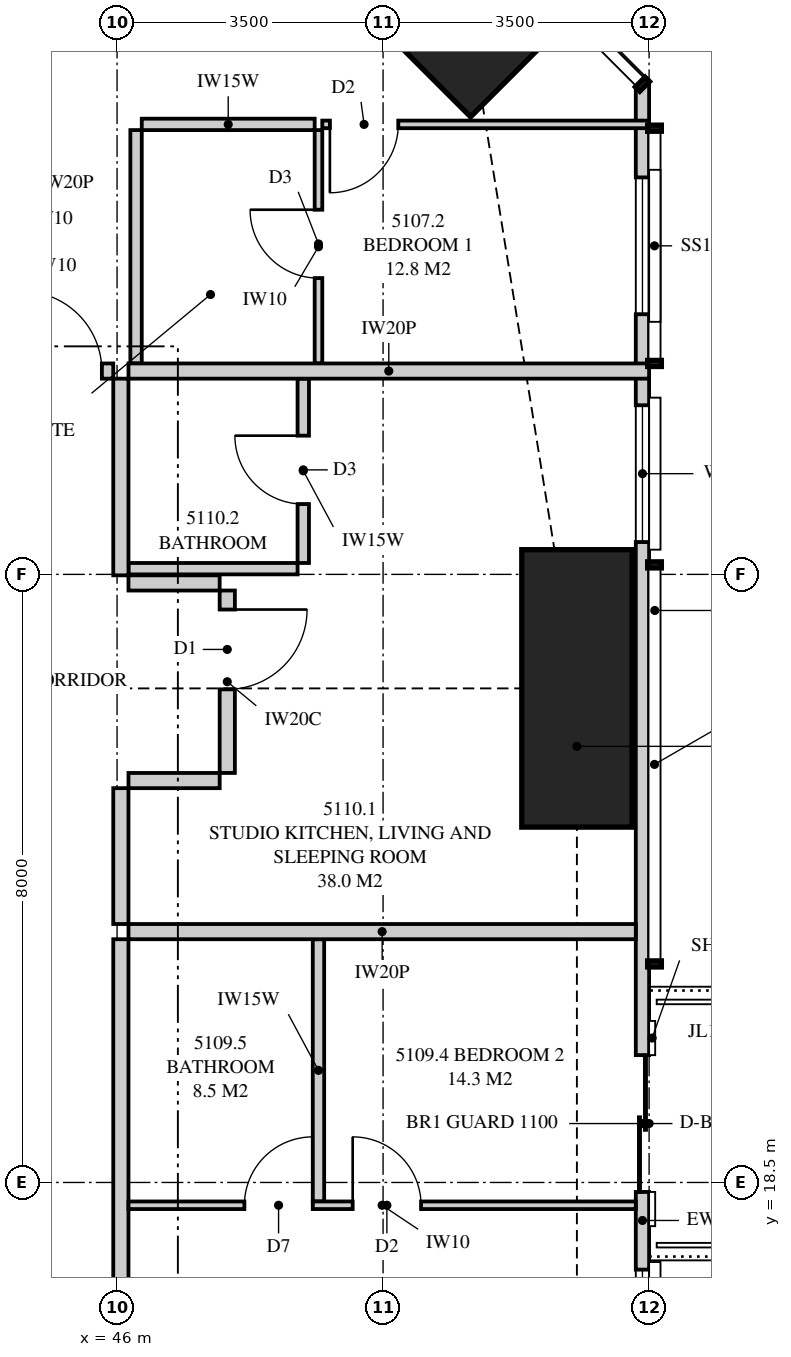
"""IFC4 building model, lengths in metres.
Left out: names, types, materials, properties, quantities, classifications, styles, units other than length and angle.
Written with IfcOpenShell. Run it as: python <this file> out.ifc"""

import sys

from ifc_helpers import new_model, si_unit, direction, frame, frame_2d, origin, origin_2d, place, context, subcontext, project, spatial, polyline, rectangle, outline, extrude, element, fill, save


model = new_model("IFC4")
c1 = context("Model", 3, precision=1e-05, world=origin(), true_north=direction((0.0, 1.0)))
c2 = subcontext(c1, "Body", "Model", "MODEL_VIEW")
j1 = project(units=[si_unit("LENGTHUNIT", "METRE"), si_unit("PLANEANGLEUNIT", "RADIAN")], contexts=[c1])
p1 = place(None, origin())
s1 = spatial("IfcSite", under=j1, at=p1, CompositionType="ELEMENT")
p2 = place(p1, origin())
s2 = spatial("IfcBuilding", under=s1, at=p2, CompositionType="ELEMENT")
p3 = place(p2, frame((0.0, 0.0, 187.85)))
s3 = spatial("IfcBuildingStorey", under=s2, at=p3, CompositionType="ELEMENT", Elevation=187.85)
p4 = place(p3, frame((52.05, 25.0, 0.0), z_axis=(0.0, 0.0, 1.0), x_axis=(1.0, 0.0, 0.0)))
e1 = element("IfcColumn", 1, at=p4, inside=s3, PredefinedType="COLUMN", context=c2, shape_type="SweptSolid", body=[
    extrude(rectangle(XDim=1.45, YDim=3.65, at=origin_2d()), origin(), (0.0, 0.0, 1.0), 3.35),
])
p5 = place(p3, frame((50.652, 33.652, 0.0), z_axis=(0.0, 0.0, 1.0), x_axis=(0.707106781187, 0.707106781187, 0.0)))
e2 = element("IfcColumn", 2, at=p5, inside=s3, PredefinedType="COLUMN", context=c2, shape_type="SweptSolid", body=[
    extrude(rectangle(XDim=1.6, YDim=1.6, at=origin_2d()), origin(), (0.0, 0.0, 1.0), 3.35),
])
p6 = place(p3, frame((52.913, 3.051, 0.0), z_axis=(0.0, 0.0, 1.0), x_axis=(0.0, 1.0, 0.0)))
e3 = element("IfcWall", 3, at=p6, inside=s3, PredefinedType="SOLIDWALL", context=c2, shape_type="SweptSolid", body=[
    extrude(outline(polyline([(0.0, 0.0), (29.897, 0.0), (29.897, 3.11), (22.167, 3.11), (22.167, 2.15), (22.074, 2.15), (22.074, 3.11), (21.949, 3.11), (21.949, 2.15), (9.949, 2.15), (9.949, 3.11), (9.847, 3.11), (9.847, 2.15), (9.706, 2.15), (9.706, 3.11), (0.0, 3.11), (0.0, 0.0)])), frame((0.0, 0.087, 0.0), z_axis=(0.0, -1.0, 0.0), x_axis=(1.0, 0.0, 0.0)), (0.0, 0.0, 1.0), 0.175),
])
p7 = place(p6, frame((1.137, 0.0, 0.4)))
e4 = element("IfcOpeningElement", 4, at=p7, cuts=e3, PredefinedType="OPENING", context=c2, shape_type="SweptSolid", body=[
    extrude(rectangle(XDim=2.4, YDim=1.7, at=frame_2d((1.2, 0.85))), frame((0.0, 0.097, 0.0), z_axis=(0.0, -1.0, 0.0), x_axis=(1.0, 0.0, 0.0)), (0.0, 0.0, 1.0), 0.195),
])
p8 = place(p6, frame((5.674, 0.0, 0.4)))
e5 = element("IfcOpeningElement", 5, at=p8, cuts=e3, PredefinedType="OPENING", context=c2, shape_type="SweptSolid", body=[
    extrude(rectangle(XDim=1.8, YDim=1.7, at=frame_2d((0.9, 0.85))), frame((0.0, 0.097, 0.0), z_axis=(0.0, -1.0, 0.0), x_axis=(1.0, 0.0, 0.0)), (0.0, 0.0, 1.0), 0.195),
])
p9 = place(p6, frame((11.902, 0.0, 0.4)))
e6 = element("IfcOpeningElement", 6, at=p9, cuts=e3, PredefinedType="OPENING", context=c2, shape_type="SweptSolid", body=[
    extrude(rectangle(XDim=2.4, YDim=1.7, at=frame_2d((1.2, 0.85))), frame((0.0, 0.097, 0.0), z_axis=(0.0, -1.0, 0.0), x_axis=(1.0, 0.0, 0.0)), (0.0, 0.0, 1.0), 0.195),
])
p10 = place(p6, frame((15.324, 0.0, 0.0)))
e7 = element("IfcOpeningElement", 7, at=p10, cuts=e3, PredefinedType="OPENING", context=c2, shape_type="SweptSolid", body=[
    extrude(rectangle(XDim=1.8, YDim=2.1, at=frame_2d((0.9, 1.05))), frame((0.0, 0.097, 0.0), z_axis=(0.0, -1.0, 0.0), x_axis=(1.0, 0.0, 0.0)), (0.0, 0.0, 1.0), 0.195),
])
p11 = place(p6, frame((23.874, 0.0, 0.4)))
e8 = element("IfcOpeningElement", 8, at=p11, cuts=e3, PredefinedType="OPENING", context=c2, shape_type="SweptSolid", body=[
    extrude(rectangle(XDim=1.8, YDim=1.7, at=frame_2d((0.9, 0.85))), frame((0.0, 0.097, 0.0), z_axis=(0.0, -1.0, 0.0), x_axis=(1.0, 0.0, 0.0)), (0.0, 0.0, 1.0), 0.195),
])
p12 = place(p6, frame((26.871, 0.0, 0.4)))
e9 = element("IfcOpeningElement", 9, at=p12, cuts=e3, PredefinedType="OPENING", context=c2, shape_type="SweptSolid", body=[
    extrude(rectangle(XDim=1.8, YDim=1.7, at=frame_2d((0.9, 0.85))), frame((0.0, 0.097, 0.0), z_axis=(0.0, -1.0, 0.0), x_axis=(1.0, 0.0, 0.0)), (0.0, 0.0, 1.0), 0.195),
])
p13 = place(p3, frame((42.05, 29.175, 0.0), z_axis=(0.0, 0.0, 1.0), x_axis=(1.0, 0.0, 0.0)))
e10 = element("IfcWall", 10, at=p13, inside=s3, PredefinedType="PARTITIONING", context=c2, shape_type="SweptSolid", body=[
    extrude(outline(polyline([(0.0, 0.0), (3.9, 0.0), (3.9, 3.11), (1.037, 3.11), (1.037, 2.541), (0.363, 2.541), (0.363, 3.11), (0.0, 3.11), (0.0, 0.0)])), frame((0.0, 0.1, 0.0), z_axis=(0.0, -1.0, 0.0), x_axis=(1.0, 0.0, 0.0)), (0.0, 0.0, 1.0), 0.2),
])
p14 = place(p13, frame((2.7, 0.0, 0.0)))
e11 = element("IfcOpeningElement", 11, at=p14, cuts=e10, PredefinedType="OPENING", context=c2, shape_type="SweptSolid", body=[
    extrude(rectangle(XDim=1.05, YDim=2.2, at=frame_2d((0.525, 1.1))), frame((0.0, 0.11, 0.0), z_axis=(0.0, -1.0, 0.0), x_axis=(1.0, 0.0, 0.0)), (0.0, 0.0, 1.0), 0.22),
])
p15 = place(p3, frame((48.65, 32.345, 0.0), z_axis=(0.0, 0.0, 1.0), x_axis=(0.0, -1.0, 0.0)))
e12 = element("IfcWall", 12, at=p15, inside=s3, PredefinedType="PARTITIONING", context=c2, shape_type="SweptSolid", body=[
    extrude(rectangle(XDim=3.07, YDim=0.1, at=frame_2d((1.535, 0.0))), origin(), (0.0, 0.0, 1.0), 3.11),
])
p16 = place(p15, frame((1.048, 0.0, 0.0)))
e13 = element("IfcOpeningElement", 13, at=p16, cuts=e12, PredefinedType="OPENING", context=c2, shape_type="SweptSolid", body=[
    extrude(rectangle(XDim=0.9, YDim=2.1, at=frame_2d((0.45, 1.05))), frame((0.0, 0.06, 0.0), z_axis=(0.0, -1.0, 0.0), x_axis=(1.0, 0.0, 0.0)), (0.0, 0.0, 1.0), 0.12),
])
p17 = place(p3, frame((48.7, 32.42, 0.0), z_axis=(0.0, 0.0, 1.0), x_axis=(1.0, 0.0, 0.0)))
e14 = element("IfcWall", 14, at=p17, inside=s3, PredefinedType="PARTITIONING", context=c2, shape_type="SweptSolid", body=[
    extrude(outline(polyline([(0.0, 0.0), (4.3, 0.0), (4.3, 3.11), (3.022, 3.11), (3.022, 2.15), (1.279, 2.15), (1.279, 3.11), (0.0, 3.11), (0.0, 0.0)])), frame((0.0, 0.05, 0.0), z_axis=(0.0, -1.0, 0.0), x_axis=(1.0, 0.0, 0.0)), (0.0, 0.0, 1.0), 0.1),
])
p18 = place(p17, frame((0.1, 0.0, 0.0)))
e15 = element("IfcOpeningElement", 15, at=p18, cuts=e14, PredefinedType="OPENING", context=c2, shape_type="SweptSolid", body=[
    extrude(rectangle(XDim=0.9, YDim=2.1, at=frame_2d((0.45, 1.05))), frame((0.0, 0.06, 0.0), z_axis=(0.0, -1.0, 0.0), x_axis=(1.0, 0.0, 0.0)), (0.0, 0.0, 1.0), 0.12),
])
p19 = place(p3, frame((46.325, 32.42, 0.0), z_axis=(0.0, 0.0, 1.0), x_axis=(1.0, 0.0, 0.0)))
e16 = element("IfcWall", 16, at=p19, inside=s3, PredefinedType="PLUMBINGWALL", context=c2, shape_type="SweptSolid", body=[
    extrude(rectangle(XDim=2.275, YDim=0.15, at=frame_2d((1.138, 0.0))), origin(), (0.0, 0.0, 1.0), 3.11),
])
p20 = place(p3, frame((46.25, 32.345, 0.0), z_axis=(0.0, 0.0, 1.0), x_axis=(0.0, -1.0, 0.0)))
e17 = element("IfcWall", 17, at=p20, inside=s3, PredefinedType="PLUMBINGWALL", context=c2, shape_type="SweptSolid", body=[
    extrude(rectangle(XDim=3.07, YDim=0.15, at=frame_2d((1.535, 0.0))), origin(), (0.0, 0.0, 1.0), 3.11),
])
p21 = place(p3, frame((46.15, 29.175, 0.0), z_axis=(0.0, 0.0, 1.0), x_axis=(1.0, 0.0, 0.0)))
e18 = element("IfcWall", 18, at=p21, inside=s3, PredefinedType="PARTITIONING", context=c2, shape_type="SweptSolid", body=[
    extrude(outline(polyline([(0.0, 0.0), (6.85, 0.0), (6.85, 3.11), (6.147, 3.11), (6.147, 2.15), (4.303, 2.15), (4.303, 3.11), (0.0, 3.11), (0.0, 0.0)])), frame((0.0, 0.1, 0.0), z_axis=(0.0, -1.0, 0.0), x_axis=(1.0, 0.0, 0.0)), (0.0, 0.0, 1.0), 0.2),
])
p22 = place(p3, frame((52.825, 21.8, 0.0), z_axis=(0.0, 0.0, 1.0), x_axis=(-1.0, 0.0, 0.0)))
e19 = element("IfcWall", 19, at=p22, inside=s3, PredefinedType="PARTITIONING", context=c2, shape_type="SweptSolid", body=[
    extrude(outline(polyline([(0.0, 0.0), (6.675, 0.0), (6.675, 3.11), (1.685, 3.11), (1.685, 2.15), (0.0, 2.15), (0.0, 3.11), (0.0, 0.0)])), frame((0.0, 0.1, 0.0), z_axis=(0.0, -1.0, 0.0), x_axis=(1.0, 0.0, 0.0)), (0.0, 0.0, 1.0), 0.2),
])
p23 = place(p3, frame((46.05, 7.925, 0.0), z_axis=(0.0, 0.0, 1.0), x_axis=(0.0, 1.0, 0.0)))
e20 = element("IfcWall", 20, at=p23, inside=s3, PredefinedType="PARTITIONING", context=c2, shape_type="SweptSolid", body=[
    extrude(outline(polyline([(0.0, 0.0), (13.775, 0.0), (13.775, 3.11), (5.412, 3.11), (5.412, 2.541), (4.738, 2.541), (4.738, 3.11), (0.0, 3.11), (0.0, 0.0)])), frame((0.0, 0.1, 0.0), z_axis=(0.0, -1.0, 0.0), x_axis=(1.0, 0.0, 0.0)), (0.0, 0.0, 1.0), 0.2),
])
p24 = place(p23, frame((6.387, 0.0, 0.0)))
e21 = element("IfcOpeningElement", 21, at=p24, cuts=e20, PredefinedType="OPENING", context=c2, shape_type="SweptSolid", body=[
    extrude(rectangle(XDim=1.05, YDim=2.2, at=frame_2d((0.525, 1.1))), frame((0.0, 0.11, 0.0), z_axis=(0.0, -1.0, 0.0), x_axis=(1.0, 0.0, 0.0)), (0.0, 0.0, 1.0), 0.22),
])
p25 = place(p3, frame((52.825, 18.2, 0.0), z_axis=(0.0, 0.0, 1.0), x_axis=(-1.0, 0.0, 0.0)))
e22 = element("IfcWall", 22, at=p25, inside=s3, PredefinedType="PARTITIONING", context=c2, shape_type="SweptSolid", body=[
    extrude(outline(polyline([(0.0, 0.0), (6.675, 0.0), (6.675, 3.11), (1.635, 3.11), (1.635, 2.15), (0.0, 2.15), (0.0, 3.11), (0.0, 0.0)])), frame((0.0, 0.05, 0.0), z_axis=(0.0, -1.0, 0.0), x_axis=(1.0, 0.0, 0.0)), (0.0, 0.0, 1.0), 0.1),
])
p26 = place(p25, frame((2.825, 0.0, 0.0)))
e23 = element("IfcOpeningElement", 23, at=p26, cuts=e22, PredefinedType="OPENING", context=c2, shape_type="SweptSolid", body=[
    extrude(rectangle(XDim=0.9, YDim=2.1, at=frame_2d((0.45, 1.05))), frame((0.0, 0.06, 0.0), z_axis=(0.0, -1.0, 0.0), x_axis=(1.0, 0.0, 0.0)), (0.0, 0.0, 1.0), 0.12),
])
p27 = place(p25, frame((4.25, 0.0, 0.0)))
e24 = element("IfcOpeningElement", 24, at=p27, cuts=e22, PredefinedType="OPENING", context=c2, shape_type="SweptSolid", body=[
    extrude(rectangle(XDim=0.9, YDim=2.1, at=frame_2d((0.45, 1.05))), frame((0.0, 0.06, 0.0), z_axis=(0.0, -1.0, 0.0), x_axis=(1.0, 0.0, 0.0)), (0.0, 0.0, 1.0), 0.12),
])
p28 = place(p3, frame((48.65, 18.25, 0.0), z_axis=(0.0, 0.0, 1.0), x_axis=(0.0, 1.0, 0.0)))
e25 = element("IfcWall", 25, at=p28, inside=s3, PredefinedType="PLUMBINGWALL", context=c2, shape_type="SweptSolid", body=[
    extrude(rectangle(XDim=3.45, YDim=0.15, at=frame_2d((1.725, 0.0))), origin(), (0.0, 0.0, 1.0), 3.11),
])
p29 = place(p3, frame((46.05, 21.9, 0.0), z_axis=(0.0, 0.0, 1.0), x_axis=(0.0, 1.0, 0.0)))
e26 = element("IfcWall", 26, at=p29, inside=s3, PredefinedType="PARTITIONING", context=c2, shape_type="SweptSolid", body=[
    extrude(rectangle(XDim=1.788, YDim=0.2, at=frame_2d((0.894, 0.0))), origin(), (0.0, 0.0, 1.0), 3.11),
])
p30 = place(p3, frame((48.45, 26.65, 0.0), z_axis=(0.0, 0.0, 1.0), x_axis=(0.0, 1.0, 0.0)))
e27 = element("IfcWall", 27, at=p30, inside=s3, PredefinedType="PLUMBINGWALL", context=c2, shape_type="SweptSolid", body=[
    extrude(rectangle(XDim=2.425, YDim=0.15, at=frame_2d((1.212, 0.0))), origin(), (0.0, 0.0, 1.0), 3.11),
])
p31 = place(p30, frame((0.775, 0.0, 0.0)))
e28 = element("IfcOpeningElement", 28, at=p31, cuts=e27, PredefinedType="OPENING", context=c2, shape_type="SweptSolid", body=[
    extrude(rectangle(XDim=0.9, YDim=2.1, at=frame_2d((0.45, 1.05))), frame((0.0, 0.085, 0.0), z_axis=(0.0, -1.0, 0.0), x_axis=(1.0, 0.0, 0.0)), (0.0, 0.0, 1.0), 0.17),
])
p32 = place(p3, frame((48.375, 26.575, 0.0), z_axis=(0.0, 0.0, 1.0), x_axis=(-1.0, 0.0, 0.0)))
e29 = element("IfcWall", 29, at=p32, inside=s3, PredefinedType="PLUMBINGWALL", context=c2, shape_type="SweptSolid", body=[
    extrude(rectangle(XDim=2.225, YDim=0.15, at=frame_2d((1.113, 0.0))), origin(), (0.0, 0.0, 1.0), 3.11),
])
p33 = place(p3, frame((46.05, 26.488, 0.0), z_axis=(0.0, 0.0, 1.0), x_axis=(0.0, 1.0, 0.0)))
e30 = element("IfcWall", 30, at=p33, inside=s3, PredefinedType="PARTITIONING", context=c2, shape_type="SweptSolid", body=[
    extrude(rectangle(XDim=2.587, YDim=0.2, at=frame_2d((1.294, 0.0))), origin(), (0.0, 0.0, 1.0), 3.11),
])
p34 = place(p3, frame((47.45, 23.887, 0.0), z_axis=(0.0, 0.0, 1.0), x_axis=(0.0, 1.0, 0.0)))
e31 = element("IfcWall", 31, at=p34, inside=s3, PredefinedType="PARTITIONING", context=c2, shape_type="SweptSolid", body=[
    extrude(outline(polyline([(0.0, 0.0), (2.4, 0.0), (2.4, 3.11), (1.45, 3.11), (1.45, 2.541), (0.775, 2.541), (0.775, 3.11), (0.0, 3.11), (0.0, 0.0)])), frame((0.0, 0.1, 0.0), z_axis=(0.0, -1.0, 0.0), x_axis=(1.0, 0.0, 0.0)), (0.0, 0.0, 1.0), 0.2),
])
p35 = place(p34, frame((1.1, 0.0, 0.0)))
e32 = element("IfcOpeningElement", 32, at=p35, cuts=e31, PredefinedType="OPENING", context=c2, shape_type="SweptSolid", body=[
    extrude(rectangle(XDim=1.05, YDim=2.2, at=frame_2d((0.525, 1.1))), frame((0.0, 0.11, 0.0), z_axis=(0.0, -1.0, 0.0), x_axis=(1.0, 0.0, 0.0)), (0.0, 0.0, 1.0), 0.22),
])
for number, where, z_axis, x_axis in (
    (33, (46.15, 23.788, 0.0), (0.0, 0.0, 1.0), (1.0, 0.0, 0.0)),
    (34, (46.15, 26.387, 0.0), (0.0, 0.0, 1.0), (1.0, 0.0, 0.0)),
):
    element("IfcWall", number, at=place(p3, frame(where, z_axis=z_axis, x_axis=x_axis)), inside=s3, PredefinedType="PARTITIONING", context=c2, shape_type="SweptSolid", body=[
        extrude(rectangle(XDim=1.2, YDim=0.2, at=frame_2d((0.6, 0.0))), origin(), (0.0, 0.0, 1.0), 3.11),
    ])
p36 = place(p9, origin())
e35 = element("IfcWindow", 35, at=p36, inside=s3, PartitioningType="SINGLE_PANEL", PredefinedType="WINDOW", context=c2, shape_type="SweptSolid", body=[
    extrude(rectangle(XDim=2.4, YDim=1.7, at=frame_2d((1.2, 0.85))), frame((0.0, 0.03, 0.0), z_axis=(0.0, -1.0, 0.0), x_axis=(1.0, 0.0, 0.0)), (0.0, 0.0, 1.0), 0.06),
])
fill(e6, e35)
p37 = place(p10, origin())
e36 = element("IfcDoor", 36, at=p37, inside=s3, OperationType="SLIDING_TO_LEFT", PredefinedType="DOOR", context=c2, shape_type="SweptSolid", body=[
    extrude(rectangle(XDim=1.8, YDim=2.1, at=frame_2d((0.9, 1.05))), frame((0.0, 0.025, 0.0), z_axis=(0.0, -1.0, 0.0), x_axis=(1.0, 0.0, 0.0)), (0.0, 0.0, 1.0), 0.05),
])
fill(e7, e36)
p38 = place(p11, origin())
e37 = element("IfcWindow", 37, at=p38, inside=s3, PartitioningType="SINGLE_PANEL", PredefinedType="WINDOW", context=c2, shape_type="SweptSolid", body=[
    extrude(rectangle(XDim=1.8, YDim=1.7, at=frame_2d((0.9, 0.85))), frame((0.0, 0.03, 0.0), z_axis=(0.0, -1.0, 0.0), x_axis=(1.0, 0.0, 0.0)), (0.0, 0.0, 1.0), 0.06),
])
fill(e8, e37)
p39 = place(p12, origin())
e38 = element("IfcWindow", 38, at=p39, inside=s3, PartitioningType="SINGLE_PANEL", PredefinedType="WINDOW", context=c2, shape_type="SweptSolid", body=[
    extrude(rectangle(XDim=1.8, YDim=1.7, at=frame_2d((0.9, 0.85))), frame((0.0, 0.03, 0.0), z_axis=(0.0, -1.0, 0.0), x_axis=(1.0, 0.0, 0.0)), (0.0, 0.0, 1.0), 0.06),
])
fill(e9, e38)
p40 = place(p14, origin())
e39 = element("IfcDoor", 39, at=p40, inside=s3, OperationType="SINGLE_SWING_LEFT", PredefinedType="DOOR", context=c2, shape_type="SweptSolid", body=[
    extrude(rectangle(XDim=1.05, YDim=2.2, at=frame_2d((0.525, 1.1))), frame((0.0, 0.025, 0.0), z_axis=(0.0, -1.0, 0.0), x_axis=(1.0, 0.0, 0.0)), (0.0, 0.0, 1.0), 0.05),
])
fill(e11, e39)
p41 = place(p18, frame((0.9, 0.0, 0.0), z_axis=(0.0, 0.0, 1.0), x_axis=(-1.0, 0.0, 0.0)))
e40 = element("IfcDoor", 40, at=p41, inside=s3, OperationType="SINGLE_SWING_RIGHT", PredefinedType="DOOR", context=c2, shape_type="SweptSolid", body=[
    extrude(rectangle(XDim=0.9, YDim=2.1, at=frame_2d((0.45, 1.05))), frame((0.0, 0.025, 0.0), z_axis=(0.0, -1.0, 0.0), x_axis=(1.0, 0.0, 0.0)), (0.0, 0.0, 1.0), 0.05),
])
fill(e15, e40)
p42 = place(p16, frame((0.9, 0.0, 0.0), z_axis=(0.0, 0.0, 1.0), x_axis=(-1.0, 0.0, 0.0)))
e41 = element("IfcDoor", 41, at=p42, inside=s3, OperationType="SINGLE_SWING_RIGHT", PredefinedType="DOOR", context=c2, shape_type="SweptSolid", body=[
    extrude(rectangle(XDim=0.9, YDim=2.1, at=frame_2d((0.45, 1.05))), frame((0.0, 0.025, 0.0), z_axis=(0.0, -1.0, 0.0), x_axis=(1.0, 0.0, 0.0)), (0.0, 0.0, 1.0), 0.05),
])
fill(e13, e41)
p43 = place(p26, frame((0.9, 0.0, 0.0), z_axis=(0.0, 0.0, 1.0), x_axis=(-1.0, 0.0, 0.0)))
e42 = element("IfcDoor", 42, at=p43, inside=s3, OperationType="SINGLE_SWING_LEFT", PredefinedType="DOOR", context=c2, shape_type="SweptSolid", body=[
    extrude(rectangle(XDim=0.9, YDim=2.1, at=frame_2d((0.45, 1.05))), frame((0.0, 0.025, 0.0), z_axis=(0.0, -1.0, 0.0), x_axis=(1.0, 0.0, 0.0)), (0.0, 0.0, 1.0), 0.05),
])
fill(e23, e42)
p44 = place(p27, frame((0.9, 0.0, 0.0), z_axis=(0.0, 0.0, 1.0), x_axis=(-1.0, 0.0, 0.0)))
e43 = element("IfcDoor", 43, at=p44, inside=s3, OperationType="SINGLE_SWING_RIGHT", PredefinedType="DOOR", context=c2, shape_type="SweptSolid", body=[
    extrude(rectangle(XDim=0.9, YDim=2.1, at=frame_2d((0.45, 1.05))), frame((0.0, 0.025, 0.0), z_axis=(0.0, -1.0, 0.0), x_axis=(1.0, 0.0, 0.0)), (0.0, 0.0, 1.0), 0.05),
])
fill(e24, e43)
p45 = place(p35, frame((1.05, 0.0, 0.0), z_axis=(0.0, 0.0, 1.0), x_axis=(-1.0, 0.0, 0.0)))
e44 = element("IfcDoor", 44, at=p45, inside=s3, OperationType="SINGLE_SWING_LEFT", PredefinedType="DOOR", context=c2, shape_type="SweptSolid", body=[
    extrude(rectangle(XDim=1.05, YDim=2.2, at=frame_2d((0.525, 1.1))), frame((0.0, 0.025, 0.0), z_axis=(0.0, -1.0, 0.0), x_axis=(1.0, 0.0, 0.0)), (0.0, 0.0, 1.0), 0.05),
])
fill(e32, e44)
p46 = place(p31, origin())
e45 = element("IfcDoor", 45, at=p46, inside=s3, OperationType="SINGLE_SWING_RIGHT", PredefinedType="DOOR", context=c2, shape_type="SweptSolid", body=[
    extrude(rectangle(XDim=0.9, YDim=2.1, at=frame_2d((0.45, 1.05))), frame((0.0, 0.025, 0.0), z_axis=(0.0, -1.0, 0.0), x_axis=(1.0, 0.0, 0.0)), (0.0, 0.0, 1.0), 0.05),
])
fill(e28, e45)
save(model, sys.argv[1])
